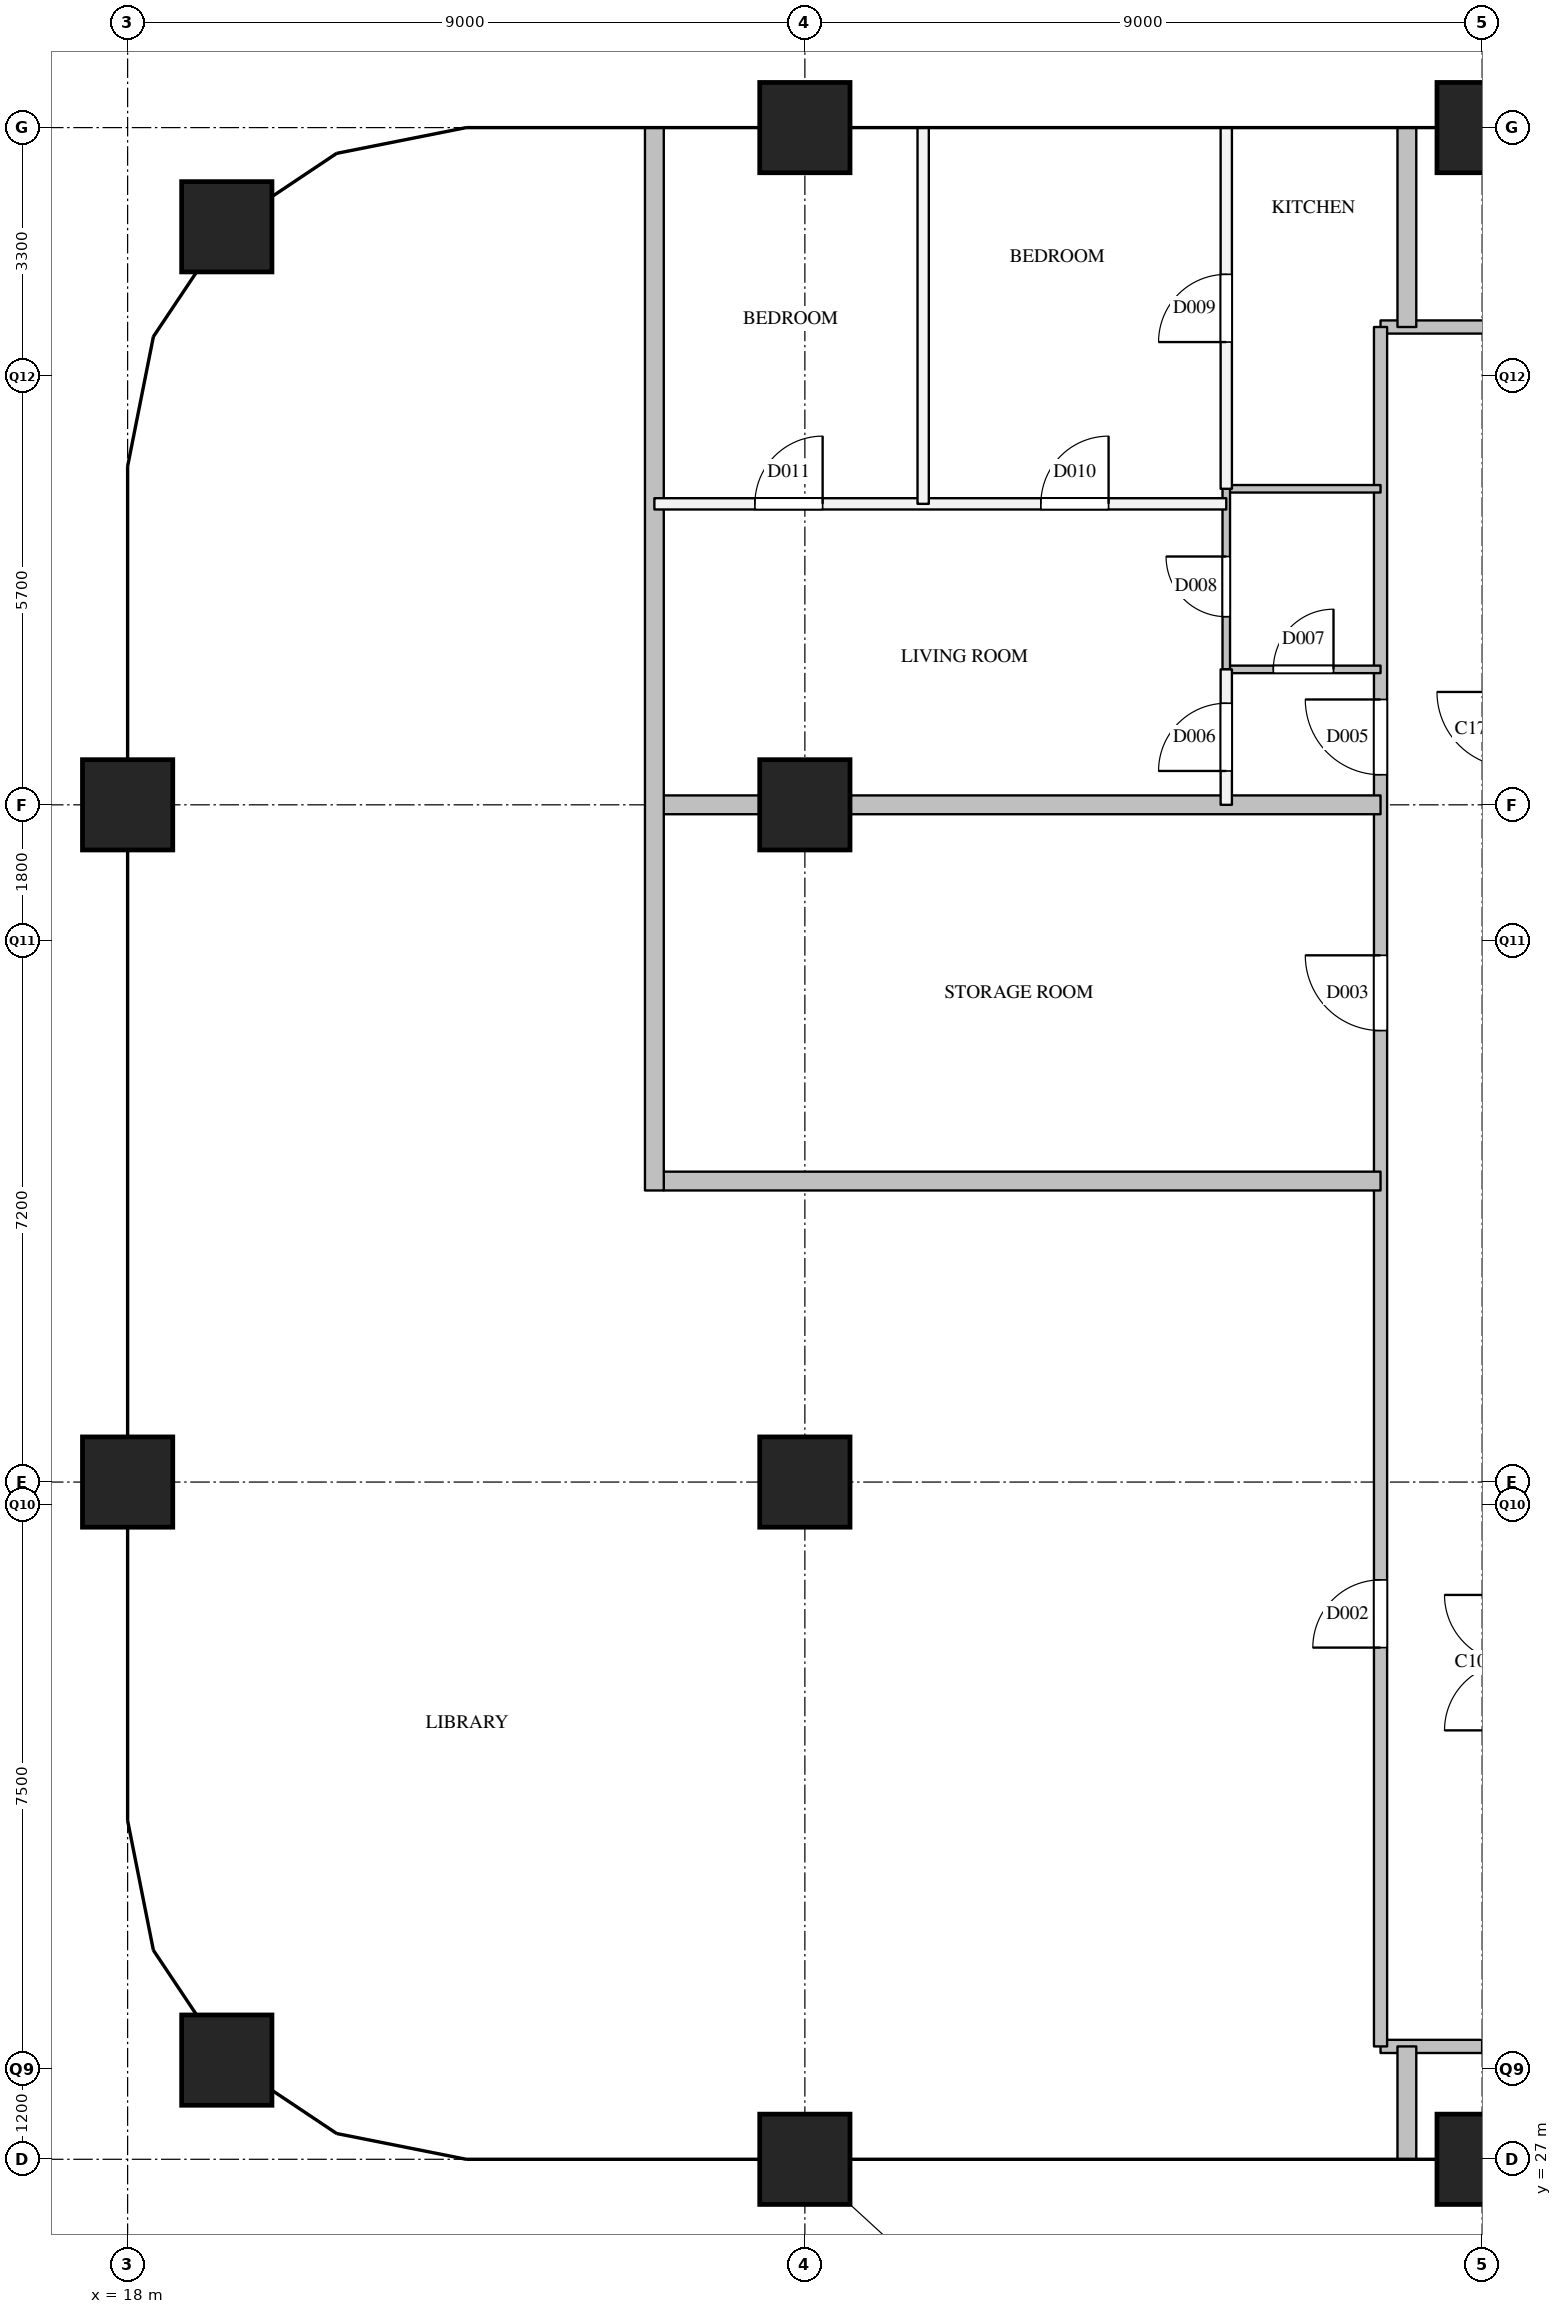
"""IFC4 building model, lengths in metres.
Left out: names, types, materials, properties, quantities, classifications, styles, units other than length and angle.
Written with IfcOpenShell. Run it as: python <this file> out.ifc"""

import sys

from ifc_helpers import new_model, si_unit, direction, frame, frame_2d, origin, origin_2d, place, context, subcontext, project, spatial, rectangle, extrude, element, fill, save


model = new_model("IFC4")
c1 = context("Model", 3, precision=1e-05, world=origin(), true_north=direction((0.0, 1.0)))
c2 = subcontext(c1, "Body", "Model", "MODEL_VIEW")
j1 = project(units=[si_unit("LENGTHUNIT", "METRE"), si_unit("PLANEANGLEUNIT", "RADIAN")], contexts=[c1])
p1 = place(None, origin())
s1 = spatial("IfcSite", under=j1, at=p1, CompositionType="ELEMENT")
p2 = place(p1, origin())
s2 = spatial("IfcBuilding", under=s1, at=p2, CompositionType="ELEMENT")
p3 = place(p2, frame((0.0, 0.0, 261.8)))
s3 = spatial("IfcBuildingStorey", under=s2, at=p3, CompositionType="ELEMENT", Elevation=261.8)
for number, where, z_axis, x_axis in (
    (1, (19.318, 28.318, 0.0), (0.0, 0.0, 1.0), (1.0, 0.0, 0.0)),
    (2, (18.0, 36.0, 0.0), (0.0, 0.0, 1.0), (1.0, 0.0, 0.0)),
    (3, (18.0, 45.0, 0.0), (0.0, 0.0, 1.0), (1.0, 0.0, 0.0)),
    (4, (19.318, 52.682, 0.0), (0.0, 0.0, 1.0), (1.0, 0.0, 0.0)),
    (5, (27.0, 27.0, 0.0), (0.0, 0.0, 1.0), (1.0, 0.0, 0.0)),
    (6, (27.0, 36.0, 0.0), (0.0, 0.0, 1.0), (1.0, 0.0, 0.0)),
    (7, (27.0, 45.0, 0.0), (0.0, 0.0, 1.0), (1.0, 0.0, 0.0)),
    (8, (27.0, 54.0, 0.0), (0.0, 0.0, 1.0), (1.0, 0.0, 0.0)),
    (9, (36.0, 27.0, 0.0), (0.0, 0.0, 1.0), (1.0, 0.0, 0.0)),
    (10, (36.0, 54.0, 0.0), (0.0, 0.0, 1.0), (1.0, 0.0, 0.0)),
):
    element("IfcColumn", number, at=place(p3, frame(where, z_axis=z_axis, x_axis=x_axis)), inside=s3, PredefinedType="COLUMN", context=c2, shape_type="SweptSolid", body=[
        extrude(rectangle(XDim=1.2, YDim=1.2, at=origin_2d()), origin(), (0.0, 0.0, 1.0), 3.9),
    ])
p4 = place(p3, frame((34.65, 28.5, 0.0), z_axis=(0.0, 0.0, 1.0), x_axis=(1.0, 0.0, 0.0)))
e11 = element("IfcWall", 11, at=p4, inside=s3, PredefinedType="PARTITIONING", context=c2, shape_type="SweptSolid", body=[
    extrude(rectangle(XDim=1.35, YDim=0.175, at=frame_2d((0.675, 0.0))), origin(), (0.0, 0.0, 1.0), 3.6),
])
p5 = place(p3, frame((34.65, 51.35, 0.0), z_axis=(0.0, 0.0, 1.0), x_axis=(1.0, 0.0, 0.0)))
e12 = element("IfcWall", 12, at=p5, inside=s3, PredefinedType="PARTITIONING", context=c2, shape_type="SweptSolid", body=[
    extrude(rectangle(XDim=15.1, YDim=0.175, at=frame_2d((7.55, 0.0))), origin(), (0.0, 0.0, 1.0), 3.6),
])
p6 = place(p5, frame((2.4, 0.0, 0.0)))
e13 = element("IfcOpeningElement", 13, at=p6, cuts=e12, PredefinedType="OPENING", context=c2, shape_type="SweptSolid", body=[
    extrude(rectangle(XDim=0.9, YDim=2.1, at=frame_2d((0.45, 1.05))), frame((0.0, 0.097, 0.0), z_axis=(0.0, -1.0, 0.0), x_axis=(1.0, 0.0, 0.0)), (0.0, 0.0, 1.0), 0.195),
])
p7 = place(p5, frame((7.35, 0.0, 0.0)))
e14 = element("IfcOpeningElement", 14, at=p7, cuts=e12, PredefinedType="OPENING", context=c2, shape_type="SweptSolid", body=[
    extrude(rectangle(XDim=1.0, YDim=2.1, at=frame_2d((0.5, 1.05))), frame((0.0, 0.097, 0.0), z_axis=(0.0, -1.0, 0.0), x_axis=(1.0, 0.0, 0.0)), (0.0, 0.0, 1.0), 0.195),
])
p8 = place(p3, frame((34.65, 28.5, 0.0), z_axis=(0.0, 0.0, 1.0), x_axis=(0.0, 1.0, 0.0)))
e15 = element("IfcWall", 15, at=p8, inside=s3, PredefinedType="PARTITIONING", context=c2, shape_type="SweptSolid", body=[
    extrude(rectangle(XDim=22.85, YDim=0.175, at=frame_2d((11.425, 0.0))), origin(), (0.0, 0.0, 1.0), 3.6),
])
p9 = place(p8, frame((5.3, 0.0, 0.0)))
e16 = element("IfcOpeningElement", 16, at=p9, cuts=e15, PredefinedType="OPENING", context=c2, shape_type="SweptSolid", body=[
    extrude(rectangle(XDim=0.9, YDim=2.1, at=frame_2d((0.45, 1.05))), frame((0.0, 0.097, 0.0), z_axis=(0.0, -1.0, 0.0), x_axis=(1.0, 0.0, 0.0)), (0.0, 0.0, 1.0), 0.195),
])
p10 = place(p8, frame((13.5, 0.0, 0.0)))
e17 = element("IfcOpeningElement", 17, at=p10, cuts=e15, PredefinedType="OPENING", context=c2, shape_type="SweptSolid", body=[
    extrude(rectangle(XDim=1.0, YDim=2.1, at=frame_2d((0.5, 1.05))), frame((0.0, 0.097, 0.0), z_axis=(0.0, -1.0, 0.0), x_axis=(1.0, 0.0, 0.0)), (0.0, 0.0, 1.0), 0.195),
])
p11 = place(p8, frame((16.9, 0.0, 0.0)))
e18 = element("IfcOpeningElement", 18, at=p11, cuts=e15, PredefinedType="OPENING", context=c2, shape_type="SweptSolid", body=[
    extrude(rectangle(XDim=1.0, YDim=2.1, at=frame_2d((0.5, 1.05))), frame((0.0, 0.097, 0.0), z_axis=(0.0, -1.0, 0.0), x_axis=(1.0, 0.0, 0.0)), (0.0, 0.0, 1.0), 0.195),
])
p12 = place(p3, frame((25.0, 49.0, 0.0), z_axis=(0.0, 0.0, 1.0), x_axis=(1.0, 0.0, 0.0)))
e19 = element("IfcWall", 19, at=p12, inside=s3, PredefinedType="PARTITIONING", context=c2, shape_type="SweptSolid", body=[
    extrude(rectangle(XDim=7.6, YDim=0.15, at=frame_2d((3.8, 0.0))), origin(), (0.0, 0.0, 1.0), 2.6),
])
p13 = place(p12, frame((5.136, 0.0, 0.0)))
e20 = element("IfcOpeningElement", 20, at=p13, cuts=e19, PredefinedType="OPENING", context=c2, shape_type="SweptSolid", body=[
    extrude(rectangle(XDim=0.9, YDim=2.1, at=frame_2d((0.45, 1.05))), frame((0.0, 0.085, 0.0), z_axis=(0.0, -1.0, 0.0), x_axis=(1.0, 0.0, 0.0)), (0.0, 0.0, 1.0), 0.17),
])
p14 = place(p12, frame((1.336, 0.0, 0.0)))
e21 = element("IfcOpeningElement", 21, at=p14, cuts=e19, PredefinedType="OPENING", context=c2, shape_type="SweptSolid", body=[
    extrude(rectangle(XDim=0.9, YDim=2.1, at=frame_2d((0.45, 1.05))), frame((0.0, 0.085, 0.0), z_axis=(0.0, -1.0, 0.0), x_axis=(1.0, 0.0, 0.0)), (0.0, 0.0, 1.0), 0.17),
])
p15 = place(p3, frame((28.572, 49.0, 0.0), z_axis=(0.0, 0.0, 1.0), x_axis=(0.0, 1.0, 0.0)))
e22 = element("IfcWall", 22, at=p15, inside=s3, PredefinedType="PARTITIONING", context=c2, shape_type="SweptSolid", body=[
    extrude(rectangle(XDim=5.0, YDim=0.15, at=frame_2d((2.5, 0.0))), origin(), (0.0, 0.0, 1.0), 2.6),
])
p16 = place(p3, frame((32.6, 45.0, 0.0), z_axis=(0.0, 0.0, 1.0), x_axis=(0.0, 1.0, 0.0)))
e23 = element("IfcWall", 23, at=p16, inside=s3, PredefinedType="PARTITIONING", context=c2, shape_type="SweptSolid", body=[
    extrude(rectangle(XDim=1.8, YDim=0.15, at=frame_2d((0.9, 0.0))), origin(), (0.0, 0.0, 1.0), 3.6),
])
p17 = place(p16, frame((0.45, 0.0, 0.0)))
e24 = element("IfcOpeningElement", 24, at=p17, cuts=e23, PredefinedType="OPENING", context=c2, shape_type="SweptSolid", body=[
    extrude(rectangle(XDim=0.9, YDim=2.1, at=frame_2d((0.45, 1.05))), frame((0.0, 0.085, 0.0), z_axis=(0.0, -1.0, 0.0), x_axis=(1.0, 0.0, 0.0)), (0.0, 0.0, 1.0), 0.17),
])
p18 = place(p3, frame((32.6, 49.2, 0.0), z_axis=(0.0, 0.0, 1.0), x_axis=(0.0, 1.0, 0.0)))
e25 = element("IfcWall", 25, at=p18, inside=s3, PredefinedType="PARTITIONING", context=c2, shape_type="SweptSolid", body=[
    extrude(rectangle(XDim=4.8, YDim=0.15, at=frame_2d((2.4, 0.0))), origin(), (0.0, 0.0, 1.0), 2.6),
])
p19 = place(p18, frame((1.95, 0.0, 0.0)))
e26 = element("IfcOpeningElement", 26, at=p19, cuts=e25, PredefinedType="OPENING", context=c2, shape_type="SweptSolid", body=[
    extrude(rectangle(XDim=0.9, YDim=2.1, at=frame_2d((0.45, 1.05))), frame((0.0, 0.085, 0.0), z_axis=(0.0, -1.0, 0.0), x_axis=(1.0, 0.0, 0.0)), (0.0, 0.0, 1.0), 0.17),
])
p20 = place(p3, frame((25.125, 40.0, 0.0), z_axis=(0.0, 0.0, 1.0), x_axis=(1.0, 0.0, 0.0)))
e27 = element("IfcWall", 27, at=p20, inside=s3, PredefinedType="PARTITIONING", context=c2, shape_type="SweptSolid", body=[
    extrude(rectangle(XDim=9.525, YDim=0.25, at=frame_2d((4.762, 0.0))), origin(), (0.0, 0.0, 1.0), 2.6),
])
p21 = place(p3, frame((25.0, 45.0, 0.0), z_axis=(0.0, 0.0, 1.0), x_axis=(1.0, 0.0, 0.0)))
e28 = element("IfcWall", 28, at=p21, inside=s3, PredefinedType="PARTITIONING", context=c2, shape_type="SweptSolid", body=[
    extrude(rectangle(XDim=9.65, YDim=0.25, at=frame_2d((4.825, 0.0))), origin(), (0.0, 0.0, 1.0), 3.6),
])
p22 = place(p3, frame((25.0, 39.875, 0.0), z_axis=(0.0, 0.0, 1.0), x_axis=(0.0, 1.0, 0.0)))
e29 = element("IfcWall", 29, at=p22, inside=s3, PredefinedType="PARTITIONING", context=c2, shape_type="SweptSolid", body=[
    extrude(rectangle(XDim=14.125, YDim=0.25, at=frame_2d((7.062, 0.0))), origin(), (0.0, 0.0, 1.0), 2.6),
])
p23 = place(p3, frame((35.0, 27.0, 0.0), z_axis=(0.0, 0.0, 1.0), x_axis=(0.0, 1.0, 0.0)))
e30 = element("IfcWall", 30, at=p23, inside=s3, PredefinedType="PARTITIONING", context=c2, shape_type="SweptSolid", body=[
    extrude(rectangle(XDim=1.5, YDim=0.25, at=frame_2d((0.75, 0.0))), origin(), (0.0, 0.0, 1.0), 2.6),
])
p24 = place(p3, frame((35.0, 51.35, 0.0), z_axis=(0.0, 0.0, 1.0), x_axis=(0.0, 1.0, 0.0)))
e31 = element("IfcWall", 31, at=p24, inside=s3, PredefinedType="PARTITIONING", context=c2, shape_type="SweptSolid", body=[
    extrude(rectangle(XDim=2.65, YDim=0.25, at=frame_2d((1.325, 0.0))), origin(), (0.0, 0.0, 1.0), 2.6),
])
p25 = place(p3, frame((32.6, 46.8, 0.0), z_axis=(0.0, 0.0, 1.0), x_axis=(1.0, 0.0, 0.0)))
e32 = element("IfcWall", 32, at=p25, inside=s3, PredefinedType="PARTITIONING", context=c2, shape_type="SweptSolid", body=[
    extrude(rectangle(XDim=2.05, YDim=0.1, at=frame_2d((1.025, 0.0))), origin(), (0.0, 0.0, 1.0), 3.6),
])
p26 = place(p25, frame((0.625, 0.0, 0.0)))
e33 = element("IfcOpeningElement", 33, at=p26, cuts=e32, PredefinedType="OPENING", context=c2, shape_type="SweptSolid", body=[
    extrude(rectangle(XDim=0.8, YDim=2.1, at=frame_2d((0.4, 1.05))), frame((0.0, 0.06, 0.0), z_axis=(0.0, -1.0, 0.0), x_axis=(1.0, 0.0, 0.0)), (0.0, 0.0, 1.0), 0.12),
])
p27 = place(p3, frame((32.6, 49.2, 0.0), z_axis=(0.0, 0.0, 1.0), x_axis=(1.0, 0.0, 0.0)))
e34 = element("IfcWall", 34, at=p27, inside=s3, PredefinedType="PARTITIONING", context=c2, shape_type="SweptSolid", body=[
    extrude(rectangle(XDim=2.05, YDim=0.1, at=frame_2d((1.025, 0.0))), origin(), (0.0, 0.0, 1.0), 3.6),
])
p28 = place(p3, frame((32.6, 46.8, 0.0), z_axis=(0.0, 0.0, 1.0), x_axis=(0.0, 1.0, 0.0)))
e35 = element("IfcWall", 35, at=p28, inside=s3, PredefinedType="PARTITIONING", context=c2, shape_type="SweptSolid", body=[
    extrude(rectangle(XDim=2.4, YDim=0.1, at=frame_2d((1.2, 0.0))), origin(), (0.0, 0.0, 1.0), 3.6),
])
p29 = place(p28, frame((0.7, 0.0, 0.0)))
e36 = element("IfcOpeningElement", 36, at=p29, cuts=e35, PredefinedType="OPENING", context=c2, shape_type="SweptSolid", body=[
    extrude(rectangle(XDim=0.8, YDim=2.1, at=frame_2d((0.4, 1.05))), frame((0.0, 0.06, 0.0), z_axis=(0.0, -1.0, 0.0), x_axis=(1.0, 0.0, 0.0)), (0.0, 0.0, 1.0), 0.12),
])
p30 = place(p9, origin())
e37 = element("IfcDoor", 37, at=p30, inside=s3, OperationType="SINGLE_SWING_LEFT", PredefinedType="DOOR", context=c2, shape_type="SweptSolid", body=[
    extrude(rectangle(XDim=0.9, YDim=2.1, at=frame_2d((0.45, 1.05))), frame((0.0, 0.025, 0.0), z_axis=(0.0, -1.0, 0.0), x_axis=(1.0, 0.0, 0.0)), (0.0, 0.0, 1.0), 0.05),
])
fill(e16, e37)
p31 = place(p10, origin())
e38 = element("IfcDoor", 38, at=p31, inside=s3, OperationType="SINGLE_SWING_RIGHT", PredefinedType="DOOR", context=c2, shape_type="SweptSolid", body=[
    extrude(rectangle(XDim=1.0, YDim=2.1, at=frame_2d((0.5, 1.05))), frame((0.0, 0.025, 0.0), z_axis=(0.0, -1.0, 0.0), x_axis=(1.0, 0.0, 0.0)), (0.0, 0.0, 1.0), 0.05),
])
fill(e17, e38)
p32 = place(p11, origin())
e39 = element("IfcDoor", 39, at=p32, inside=s3, OperationType="SINGLE_SWING_RIGHT", PredefinedType="DOOR", context=c2, shape_type="SweptSolid", body=[
    extrude(rectangle(XDim=1.0, YDim=2.1, at=frame_2d((0.5, 1.05))), frame((0.0, 0.025, 0.0), z_axis=(0.0, -1.0, 0.0), x_axis=(1.0, 0.0, 0.0)), (0.0, 0.0, 1.0), 0.05),
])
fill(e18, e39)
p33 = place(p17, origin())
e40 = element("IfcDoor", 40, at=p33, inside=s3, OperationType="SINGLE_SWING_LEFT", PredefinedType="DOOR", context=c2, shape_type="SweptSolid", body=[
    extrude(rectangle(XDim=0.9, YDim=2.1, at=frame_2d((0.45, 1.05))), frame((0.0, 0.025, 0.0), z_axis=(0.0, -1.0, 0.0), x_axis=(1.0, 0.0, 0.0)), (0.0, 0.0, 1.0), 0.05),
])
fill(e24, e40)
p34 = place(p26, origin())
e41 = element("IfcDoor", 41, at=p34, inside=s3, OperationType="SINGLE_SWING_RIGHT", PredefinedType="DOOR", context=c2, shape_type="SweptSolid", body=[
    extrude(rectangle(XDim=0.8, YDim=2.1, at=frame_2d((0.4, 1.05))), frame((0.0, 0.025, 0.0), z_axis=(0.0, -1.0, 0.0), x_axis=(1.0, 0.0, 0.0)), (0.0, 0.0, 1.0), 0.05),
])
fill(e33, e41)
p35 = place(p29, origin())
e42 = element("IfcDoor", 42, at=p35, inside=s3, OperationType="SINGLE_SWING_RIGHT", PredefinedType="DOOR", context=c2, shape_type="SweptSolid", body=[
    extrude(rectangle(XDim=0.8, YDim=2.1, at=frame_2d((0.4, 1.05))), frame((0.0, 0.025, 0.0), z_axis=(0.0, -1.0, 0.0), x_axis=(1.0, 0.0, 0.0)), (0.0, 0.0, 1.0), 0.05),
])
fill(e36, e42)
p36 = place(p19, origin())
e43 = element("IfcDoor", 43, at=p36, inside=s3, OperationType="SINGLE_SWING_LEFT", PredefinedType="DOOR", context=c2, shape_type="SweptSolid", body=[
    extrude(rectangle(XDim=0.9, YDim=2.1, at=frame_2d((0.45, 1.05))), frame((0.0, 0.025, 0.0), z_axis=(0.0, -1.0, 0.0), x_axis=(1.0, 0.0, 0.0)), (0.0, 0.0, 1.0), 0.05),
])
fill(e26, e43)
p37 = place(p13, origin())
e44 = element("IfcDoor", 44, at=p37, inside=s3, OperationType="SINGLE_SWING_RIGHT", PredefinedType="DOOR", context=c2, shape_type="SweptSolid", body=[
    extrude(rectangle(XDim=0.9, YDim=2.1, at=frame_2d((0.45, 1.05))), frame((0.0, 0.025, 0.0), z_axis=(0.0, -1.0, 0.0), x_axis=(1.0, 0.0, 0.0)), (0.0, 0.0, 1.0), 0.05),
])
fill(e20, e44)
p38 = place(p14, origin())
e45 = element("IfcDoor", 45, at=p38, inside=s3, OperationType="SINGLE_SWING_RIGHT", PredefinedType="DOOR", context=c2, shape_type="SweptSolid", body=[
    extrude(rectangle(XDim=0.9, YDim=2.1, at=frame_2d((0.45, 1.05))), frame((0.0, 0.025, 0.0), z_axis=(0.0, -1.0, 0.0), x_axis=(1.0, 0.0, 0.0)), (0.0, 0.0, 1.0), 0.05),
])
fill(e21, e45)
save(model, sys.argv[1])
